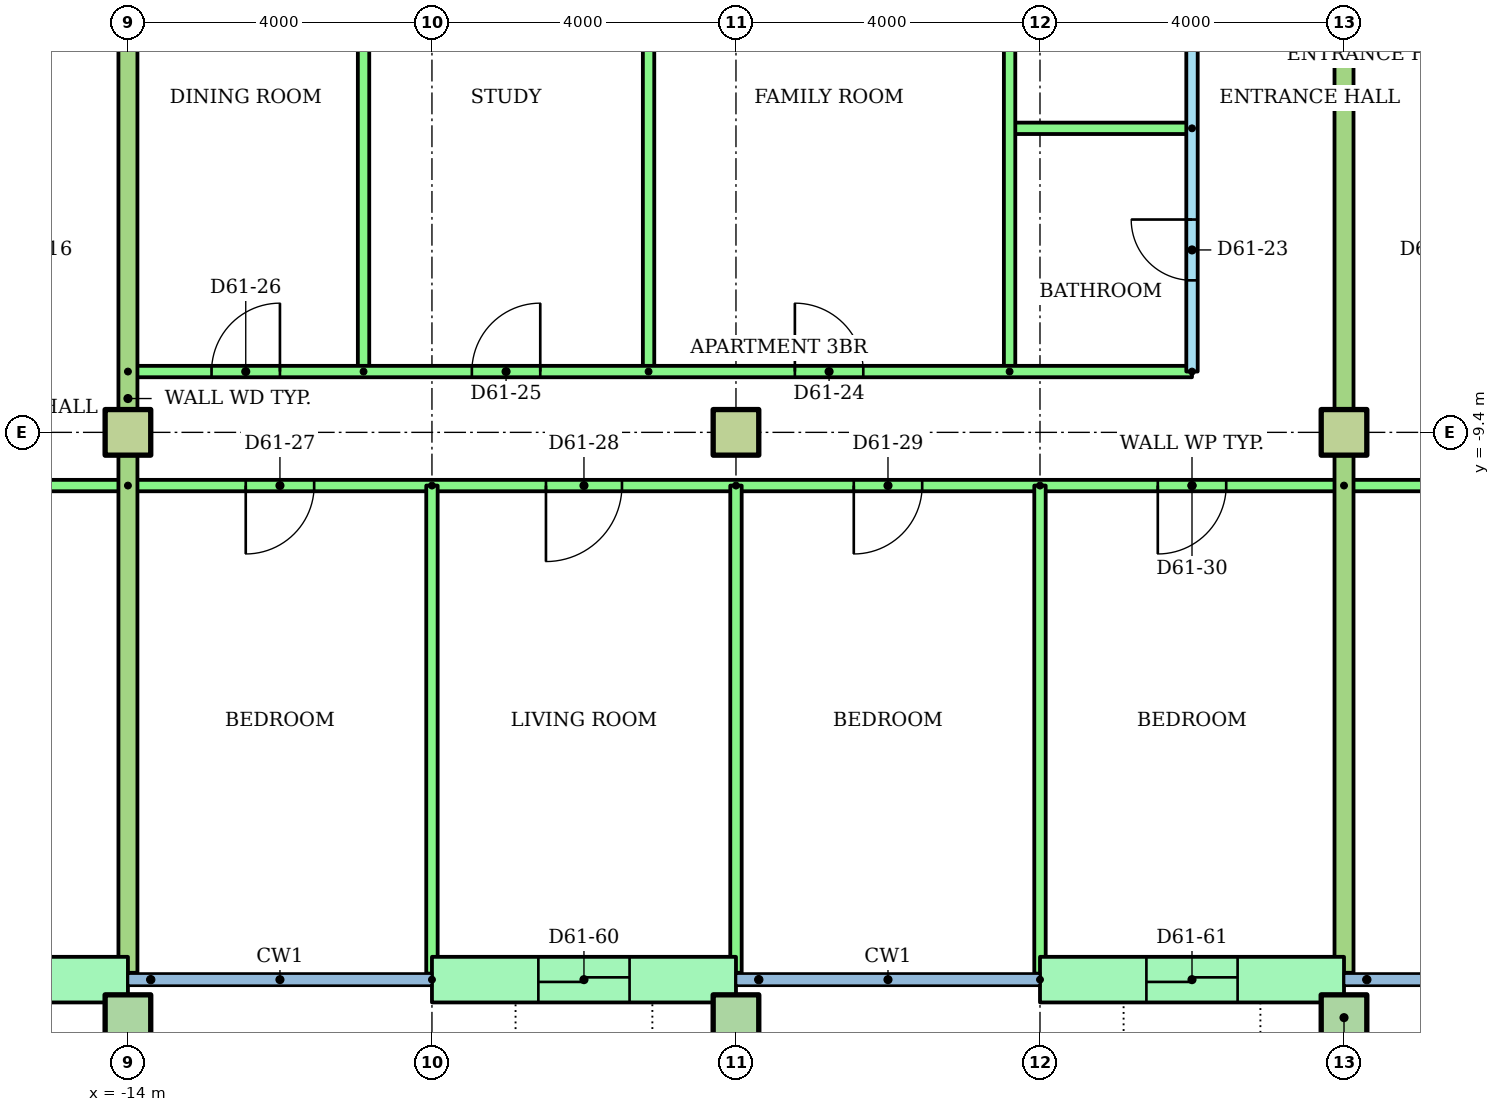
"""IFC4 building model, lengths in metres.
Left out: names, types, materials, properties, quantities, classifications, styles, units other than length and angle.
Written with IfcOpenShell. Run it as: python <this file> out.ifc"""

import sys

from ifc_helpers import new_model, si_unit, direction, frame, frame_2d, origin, origin_2d, place, context, subcontext, project, spatial, rectangle, hollow_rectangle, extrude, element, fill, save


model = new_model("IFC4")
c1 = context("Model", 3, precision=1e-05, world=origin(), true_north=direction((0.0, 1.0)))
c2 = subcontext(c1, "Body", "Model", "MODEL_VIEW")
j1 = project(units=[si_unit("LENGTHUNIT", "METRE"), si_unit("PLANEANGLEUNIT", "RADIAN")], contexts=[c1])
p1 = place(None, origin())
s1 = spatial("IfcSite", under=j1, at=p1, CompositionType="ELEMENT")
p2 = place(p1, origin())
s2 = spatial("IfcBuilding", under=s1, at=p2, CompositionType="ELEMENT")
p3 = place(p2, frame((0.0, 0.0, 233.2)))
s3 = spatial("IfcBuildingStorey", under=s2, at=p3, CompositionType="ELEMENT", Elevation=233.2)
for number, where in (
    (1, (-14.0, -17.1, 0.0)),
    (2, (-6.0, -17.1, 0.0)),
    (3, (2.0, -17.1, 0.0)),
):
    element("IfcColumn", number, at=place(p3, frame(where)), inside=s3, PredefinedType="COLUMN", context=c2, shape_type="SweptSolid", body=[
        extrude(hollow_rectangle(XDim=0.6, YDim=0.6, WallThickness=0.03, at=origin_2d()), origin(), (0.0, 0.0, 1.0), 3.2),
    ])
for number, where in (
    (4, (-14.0, -9.4, 0.0)),
    (5, (-6.0, -9.4, 0.0)),
    (6, (2.0, -9.4, 0.0)),
):
    element("IfcColumn", number, at=place(p3, frame(where)), inside=s3, PredefinedType="COLUMN", context=c2, shape_type="SweptSolid", body=[
        extrude(rectangle(XDim=0.6, YDim=0.6, at=origin_2d()), origin(), (0.0, 0.0, 1.0), 3.2),
    ])
p4 = place(p3, frame((-18.0, -16.6, 0.0)))
e7 = element("IfcWall", 7, at=p4, inside=s3, PredefinedType="STANDARD", context=c2, shape_type="SweptSolid", body=[
    extrude(rectangle(XDim=4.0, YDim=0.6, at=frame_2d((2.0, 0.0))), origin(), (0.0, 0.0, 1.0), 2.92),
])
p5 = place(p4, frame((1.4, 0.0, 0.0)))
e8 = element("IfcOpeningElement", 8, at=p5, cuts=e7, PredefinedType="OPENING", context=c2, shape_type="SweptSolid", body=[
    extrude(rectangle(XDim=1.2, YDim=2.1, at=frame_2d((0.6, 1.05))), frame((0.0, 0.31, 0.0), z_axis=(0.0, -1.0, 0.0), x_axis=(1.0, 0.0, 0.0)), (0.0, 0.0, 1.0), 0.62),
])
p6 = place(p3, frame((-10.0, -16.6, 0.0)))
e9 = element("IfcWall", 9, at=p6, inside=s3, PredefinedType="STANDARD", context=c2, shape_type="SweptSolid", body=[
    extrude(rectangle(XDim=4.0, YDim=0.6, at=frame_2d((2.0, 0.0))), origin(), (0.0, 0.0, 1.0), 2.92),
])
p7 = place(p6, frame((1.4, 0.0, 0.0)))
e10 = element("IfcOpeningElement", 10, at=p7, cuts=e9, PredefinedType="OPENING", context=c2, shape_type="SweptSolid", body=[
    extrude(rectangle(XDim=1.2, YDim=2.1, at=frame_2d((0.6, 1.05))), frame((0.0, 0.31, 0.0), z_axis=(0.0, -1.0, 0.0), x_axis=(1.0, 0.0, 0.0)), (0.0, 0.0, 1.0), 0.62),
])
p8 = place(p3, frame((-2.0, -16.6, 0.0)))
e11 = element("IfcWall", 11, at=p8, inside=s3, PredefinedType="STANDARD", context=c2, shape_type="SweptSolid", body=[
    extrude(rectangle(XDim=4.0, YDim=0.6, at=frame_2d((2.0, 0.0))), origin(), (0.0, 0.0, 1.0), 2.92),
])
p9 = place(p8, frame((1.4, 0.0, 0.0)))
e12 = element("IfcOpeningElement", 12, at=p9, cuts=e11, PredefinedType="OPENING", context=c2, shape_type="SweptSolid", body=[
    extrude(rectangle(XDim=1.2, YDim=2.1, at=frame_2d((0.6, 1.05))), frame((0.0, 0.31, 0.0), z_axis=(0.0, -1.0, 0.0), x_axis=(1.0, 0.0, 0.0)), (0.0, 0.0, 1.0), 0.62),
])
p10 = place(p3, frame((-14.0, -10.1, 0.0), z_axis=(0.0, 0.0, 1.0), x_axis=(-1.0, 0.0, 0.0)))
e13 = element("IfcWall", 13, at=p10, inside=s3, PredefinedType="PARTITIONING", context=c2, shape_type="SweptSolid", body=[
    extrude(rectangle(XDim=14.92, YDim=0.15, at=frame_2d((7.46, 0.0))), origin(), (0.0, 0.0, 1.0), 2.4),
])
p11 = place(p10, frame((12.0, 0.0, 0.0)))
e14 = element("IfcOpeningElement", 14, at=p11, cuts=e13, PredefinedType="OPENING", context=c2, shape_type="SweptSolid", body=[
    extrude(rectangle(XDim=0.9, YDim=2.1, at=frame_2d((0.45, 1.05))), frame((0.0, 0.085, 0.0), z_axis=(0.0, -1.0, 0.0), x_axis=(1.0, 0.0, 0.0)), (0.0, 0.0, 1.0), 0.17),
])
p12 = place(p10, frame((4.6, 0.0, 0.0)))
e15 = element("IfcOpeningElement", 15, at=p12, cuts=e13, PredefinedType="OPENING", context=c2, shape_type="SweptSolid", body=[
    extrude(rectangle(XDim=1.0, YDim=2.1, at=frame_2d((0.5, 1.05))), frame((0.0, 0.085, 0.0), z_axis=(0.0, -1.0, 0.0), x_axis=(1.0, 0.0, 0.0)), (0.0, 0.0, 1.0), 0.17),
])
p13 = place(p3, frame((0.0, -8.6, 0.0), z_axis=(0.0, 0.0, 1.0), x_axis=(0.0, 1.0, 0.0)))
e16 = element("IfcWall", 16, at=p13, inside=s3, PredefinedType="PARTITIONING", context=c2, shape_type="SweptSolid", body=[
    extrude(rectangle(XDim=7.2, YDim=0.15, at=frame_2d((3.6, 0.0))), origin(), (0.0, 0.0, 1.0), 2.4),
])
p14 = place(p13, frame((4.75, 0.0, 0.0)))
e17 = element("IfcOpeningElement", 17, at=p14, cuts=e16, PredefinedType="OPENING", context=c2, shape_type="SweptSolid", body=[
    extrude(rectangle(XDim=0.9, YDim=2.1, at=frame_2d((0.45, 1.05))), frame((0.0, 0.085, 0.0), z_axis=(0.0, -1.0, 0.0), x_axis=(1.0, 0.0, 0.0)), (0.0, 0.0, 1.0), 0.17),
])
p15 = place(p13, frame((1.2, 0.0, 0.0)))
e18 = element("IfcOpeningElement", 18, at=p15, cuts=e16, PredefinedType="OPENING", context=c2, shape_type="SweptSolid", body=[
    extrude(rectangle(XDim=0.8, YDim=2.1, at=frame_2d((0.4, 1.05))), frame((0.0, 0.085, 0.0), z_axis=(0.0, -1.0, 0.0), x_axis=(1.0, 0.0, 0.0)), (0.0, 0.0, 1.0), 0.17),
])
p16 = place(p3, frame((0.0, -5.4, 0.0), z_axis=(0.0, 0.0, 1.0), x_axis=(-1.0, 0.0, 0.0)))
e19 = element("IfcWall", 19, at=p16, inside=s3, PredefinedType="PARTITIONING", context=c2, shape_type="SweptSolid", body=[
    extrude(rectangle(XDim=2.4, YDim=0.15, at=frame_2d((1.2, 0.0))), origin(), (0.0, 0.0, 1.0), 2.4),
])
for number, where, z_axis, x_axis in (
    (20, (-2.4, -8.6, 0.0), (0.0, 0.0, 1.0), (0.0, 1.0, 0.0)),
    (21, (-7.15, -8.6, 0.0), (0.0, 0.0, 1.0), (0.0, 1.0, 0.0)),
    (22, (-10.9, -8.6, 0.0), (0.0, 0.0, 1.0), (0.0, 1.0, 0.0)),
):
    element("IfcWall", number, at=place(p3, frame(where, z_axis=z_axis, x_axis=x_axis)), inside=s3, PredefinedType="PARTITIONING", context=c2, shape_type="SweptSolid", body=[
        extrude(rectangle(XDim=7.2, YDim=0.15, at=frame_2d((3.6, 0.0))), origin(), (0.0, 0.0, 1.0), 2.4),
    ])
p17 = place(p3, frame((-14.0, -8.6, 0.0)))
e23 = element("IfcWall", 23, at=p17, inside=s3, PredefinedType="PARTITIONING", context=c2, shape_type="SweptSolid", body=[
    extrude(rectangle(XDim=14.0, YDim=0.15, at=frame_2d((7.0, 0.0))), origin(), (0.0, 0.0, 1.0), 2.4),
])
p18 = place(p17, frame((8.775, 0.0, 0.0)))
e24 = element("IfcOpeningElement", 24, at=p18, cuts=e23, PredefinedType="OPENING", context=c2, shape_type="SweptSolid", body=[
    extrude(rectangle(XDim=0.9, YDim=2.1, at=frame_2d((0.45, 1.05))), frame((0.0, 0.085, 0.0), z_axis=(0.0, -1.0, 0.0), x_axis=(1.0, 0.0, 0.0)), (0.0, 0.0, 1.0), 0.17),
])
p19 = place(p17, frame((4.525, 0.0, 0.0)))
e25 = element("IfcOpeningElement", 25, at=p19, cuts=e23, PredefinedType="OPENING", context=c2, shape_type="SweptSolid", body=[
    extrude(rectangle(XDim=0.9, YDim=2.1, at=frame_2d((0.45, 1.05))), frame((0.0, 0.085, 0.0), z_axis=(0.0, -1.0, 0.0), x_axis=(1.0, 0.0, 0.0)), (0.0, 0.0, 1.0), 0.17),
])
p20 = place(p17, frame((1.1, 0.0, 0.0)))
e26 = element("IfcOpeningElement", 26, at=p20, cuts=e23, PredefinedType="OPENING", context=c2, shape_type="SweptSolid", body=[
    extrude(rectangle(XDim=0.9, YDim=2.1, at=frame_2d((0.45, 1.05))), frame((0.0, 0.085, 0.0), z_axis=(0.0, -1.0, 0.0), x_axis=(1.0, 0.0, 0.0)), (0.0, 0.0, 1.0), 0.17),
])
p21 = place(p3, frame((2.0, -10.1, 0.0), z_axis=(0.0, 0.0, 1.0), x_axis=(-1.0, 0.0, 0.0)))
e27 = element("IfcWall", 27, at=p21, inside=s3, PredefinedType="PARTITIONING", context=c2, shape_type="SweptSolid", body=[
    extrude(rectangle(XDim=16.0, YDim=0.15, at=frame_2d((8.0, 0.0))), origin(), (0.0, 0.0, 1.0), 2.4),
])
p22 = place(p21, frame((13.55, 0.0, 0.0)))
e28 = element("IfcOpeningElement", 28, at=p22, cuts=e27, PredefinedType="OPENING", context=c2, shape_type="SweptSolid", body=[
    extrude(rectangle(XDim=0.9, YDim=2.1, at=frame_2d((0.45, 1.05))), frame((0.0, 0.085, 0.0), z_axis=(0.0, -1.0, 0.0), x_axis=(1.0, 0.0, 0.0)), (0.0, 0.0, 1.0), 0.17),
])
p23 = place(p21, frame((9.5, 0.0, 0.0)))
e29 = element("IfcOpeningElement", 29, at=p23, cuts=e27, PredefinedType="OPENING", context=c2, shape_type="SweptSolid", body=[
    extrude(rectangle(XDim=1.0, YDim=2.1, at=frame_2d((0.5, 1.05))), frame((0.0, 0.085, 0.0), z_axis=(0.0, -1.0, 0.0), x_axis=(1.0, 0.0, 0.0)), (0.0, 0.0, 1.0), 0.17),
])
p24 = place(p21, frame((5.55, 0.0, 0.0)))
e30 = element("IfcOpeningElement", 30, at=p24, cuts=e27, PredefinedType="OPENING", context=c2, shape_type="SweptSolid", body=[
    extrude(rectangle(XDim=0.9, YDim=2.1, at=frame_2d((0.45, 1.05))), frame((0.0, 0.085, 0.0), z_axis=(0.0, -1.0, 0.0), x_axis=(1.0, 0.0, 0.0)), (0.0, 0.0, 1.0), 0.17),
])
p25 = place(p21, frame((1.55, 0.0, 0.0)))
e31 = element("IfcOpeningElement", 31, at=p25, cuts=e27, PredefinedType="OPENING", context=c2, shape_type="SweptSolid", body=[
    extrude(rectangle(XDim=0.9, YDim=2.1, at=frame_2d((0.45, 1.05))), frame((0.0, 0.085, 0.0), z_axis=(0.0, -1.0, 0.0), x_axis=(1.0, 0.0, 0.0)), (0.0, 0.0, 1.0), 0.17),
])
p26 = place(p3, frame((-10.0, -10.1, 0.0), z_axis=(0.0, 0.0, 1.0), x_axis=(0.0, -1.0, 0.0)))
e32 = element("IfcWall", 32, at=p26, inside=s3, PredefinedType="PARTITIONING", context=c2, shape_type="SweptSolid", body=[
    extrude(rectangle(XDim=6.421, YDim=0.15, at=frame_2d((3.21, 0.0))), origin(), (0.0, 0.0, 1.0), 2.4),
])
p27 = place(p3, frame((-6.0, -10.1, 0.0), z_axis=(0.0, 0.0, 1.0), x_axis=(0.0, -1.0, 0.0)))
e33 = element("IfcWall", 33, at=p27, inside=s3, PredefinedType="PARTITIONING", context=c2, shape_type="SweptSolid", body=[
    extrude(rectangle(XDim=6.41, YDim=0.15, at=frame_2d((3.205, 0.0))), origin(), (0.0, 0.0, 1.0), 2.4),
])
p28 = place(p3, frame((-2.0, -10.1, 0.0), z_axis=(0.0, 0.0, 1.0), x_axis=(0.0, -1.0, 0.0)))
e34 = element("IfcWall", 34, at=p28, inside=s3, PredefinedType="PARTITIONING", context=c2, shape_type="SweptSolid", body=[
    extrude(rectangle(XDim=6.421, YDim=0.15, at=frame_2d((3.21, 0.0))), origin(), (0.0, 0.0, 1.0), 2.4),
])
p29 = place(p3, frame((-14.0, -1.4, 0.0), z_axis=(0.0, 0.0, 1.0), x_axis=(0.0, -1.0, 0.0)))
e35 = element("IfcWall", 35, at=p29, inside=s3, PredefinedType="PARTITIONING", context=c2, shape_type="SweptSolid", body=[
    extrude(rectangle(XDim=15.11, YDim=0.25, at=frame_2d((7.555, 0.0))), origin(), (0.0, 0.0, 1.0), 2.4),
])
p30 = place(p3, frame((28.92, -10.1, 0.0), z_axis=(0.0, 0.0, 1.0), x_axis=(-1.0, 0.0, 0.0)))
e36 = element("IfcWall", 36, at=p30, inside=s3, PredefinedType="PARTITIONING", context=c2, shape_type="SweptSolid", body=[
    extrude(rectangle(XDim=26.92, YDim=0.15, at=frame_2d((13.46, 0.0))), origin(), (0.0, 0.0, 1.0), 2.4),
])
p31 = place(p30, frame((22.42, 0.0, 0.0)))
e37 = element("IfcOpeningElement", 37, at=p31, cuts=e36, PredefinedType="OPENING", context=c2, shape_type="SweptSolid", body=[
    extrude(rectangle(XDim=1.0, YDim=2.1, at=frame_2d((0.5, 1.05))), frame((0.0, 0.085, 0.0), z_axis=(0.0, -1.0, 0.0), x_axis=(1.0, 0.0, 0.0)), (0.0, 0.0, 1.0), 0.17),
])
p32 = place(p30, frame((16.47, 0.0, 0.0)))
e38 = element("IfcOpeningElement", 38, at=p32, cuts=e36, PredefinedType="OPENING", context=c2, shape_type="SweptSolid", body=[
    extrude(rectangle(XDim=0.9, YDim=2.1, at=frame_2d((0.45, 1.05))), frame((0.0, 0.085, 0.0), z_axis=(0.0, -1.0, 0.0), x_axis=(1.0, 0.0, 0.0)), (0.0, 0.0, 1.0), 0.17),
])
p33 = place(p30, frame((12.47, 0.0, 0.0)))
e39 = element("IfcOpeningElement", 39, at=p33, cuts=e36, PredefinedType="OPENING", context=c2, shape_type="SweptSolid", body=[
    extrude(rectangle(XDim=0.9, YDim=2.1, at=frame_2d((0.45, 1.05))), frame((0.0, 0.085, 0.0), z_axis=(0.0, -1.0, 0.0), x_axis=(1.0, 0.0, 0.0)), (0.0, 0.0, 1.0), 0.17),
])
p34 = place(p30, frame((7.37, 0.0, 0.0)))
e40 = element("IfcOpeningElement", 40, at=p34, cuts=e36, PredefinedType="OPENING", context=c2, shape_type="SweptSolid", body=[
    extrude(rectangle(XDim=0.9, YDim=2.1, at=frame_2d((0.45, 1.05))), frame((0.0, 0.085, 0.0), z_axis=(0.0, -1.0, 0.0), x_axis=(1.0, 0.0, 0.0)), (0.0, 0.0, 1.0), 0.17),
])
p35 = place(p30, frame((1.544, 0.0, 0.0)))
e41 = element("IfcOpeningElement", 41, at=p35, cuts=e36, PredefinedType="OPENING", context=c2, shape_type="SweptSolid", body=[
    extrude(rectangle(XDim=0.9, YDim=2.1, at=frame_2d((0.45, 1.05))), frame((0.0, 0.085, 0.0), z_axis=(0.0, -1.0, 0.0), x_axis=(1.0, 0.0, 0.0)), (0.0, 0.0, 1.0), 0.17),
])
p36 = place(p3, frame((2.0, -1.4, 0.0), z_axis=(0.0, 0.0, 1.0), x_axis=(0.0, -1.0, 0.0)))
e42 = element("IfcWall", 42, at=p36, inside=s3, PredefinedType="PARTITIONING", context=c2, shape_type="SweptSolid", body=[
    extrude(rectangle(XDim=15.11, YDim=0.25, at=frame_2d((7.555, 0.0))), origin(), (0.0, 0.0, 1.0), 2.4),
])
p37 = place(p15, origin())
e43 = element("IfcDoor", 43, at=p37, inside=s3, OperationType="SINGLE_SWING_RIGHT", PredefinedType="DOOR", context=c2, shape_type="SweptSolid", body=[
    extrude(rectangle(XDim=0.8, YDim=2.1, at=frame_2d((0.4, 1.05))), frame((0.0, 0.025, 0.0), z_axis=(0.0, -1.0, 0.0), x_axis=(1.0, 0.0, 0.0)), (0.0, 0.0, 1.0), 0.05),
])
fill(e18, e43)
p38 = place(p18, origin())
e44 = element("IfcDoor", 44, at=p38, inside=s3, OperationType="SINGLE_SWING_LEFT", PredefinedType="DOOR", context=c2, shape_type="SweptSolid", body=[
    extrude(rectangle(XDim=0.9, YDim=2.1, at=frame_2d((0.45, 1.05))), frame((0.0, 0.025, 0.0), z_axis=(0.0, -1.0, 0.0), x_axis=(1.0, 0.0, 0.0)), (0.0, 0.0, 1.0), 0.05),
])
fill(e24, e44)
p39 = place(p19, origin())
e45 = element("IfcDoor", 45, at=p39, inside=s3, OperationType="SINGLE_SWING_RIGHT", PredefinedType="DOOR", context=c2, shape_type="SweptSolid", body=[
    extrude(rectangle(XDim=0.9, YDim=2.1, at=frame_2d((0.45, 1.05))), frame((0.0, 0.025, 0.0), z_axis=(0.0, -1.0, 0.0), x_axis=(1.0, 0.0, 0.0)), (0.0, 0.0, 1.0), 0.05),
])
fill(e25, e45)
p40 = place(p20, origin())
e46 = element("IfcDoor", 46, at=p40, inside=s3, OperationType="SINGLE_SWING_RIGHT", PredefinedType="DOOR", context=c2, shape_type="SweptSolid", body=[
    extrude(rectangle(XDim=0.9, YDim=2.1, at=frame_2d((0.45, 1.05))), frame((0.0, 0.025, 0.0), z_axis=(0.0, -1.0, 0.0), x_axis=(1.0, 0.0, 0.0)), (0.0, 0.0, 1.0), 0.05),
])
fill(e26, e46)
p41 = place(p22, origin())
e47 = element("IfcDoor", 47, at=p41, inside=s3, OperationType="SINGLE_SWING_RIGHT", PredefinedType="DOOR", context=c2, shape_type="SweptSolid", body=[
    extrude(rectangle(XDim=0.9, YDim=2.1, at=frame_2d((0.45, 1.05))), frame((0.0, 0.025, 0.0), z_axis=(0.0, -1.0, 0.0), x_axis=(1.0, 0.0, 0.0)), (0.0, 0.0, 1.0), 0.05),
])
fill(e28, e47)
p42 = place(p23, origin())
e48 = element("IfcDoor", 48, at=p42, inside=s3, OperationType="SINGLE_SWING_RIGHT", PredefinedType="DOOR", context=c2, shape_type="SweptSolid", body=[
    extrude(rectangle(XDim=1.0, YDim=2.1, at=frame_2d((0.5, 1.05))), frame((0.0, 0.025, 0.0), z_axis=(0.0, -1.0, 0.0), x_axis=(1.0, 0.0, 0.0)), (0.0, 0.0, 1.0), 0.05),
])
fill(e29, e48)
p43 = place(p24, origin())
e49 = element("IfcDoor", 49, at=p43, inside=s3, OperationType="SINGLE_SWING_RIGHT", PredefinedType="DOOR", context=c2, shape_type="SweptSolid", body=[
    extrude(rectangle(XDim=0.9, YDim=2.1, at=frame_2d((0.45, 1.05))), frame((0.0, 0.025, 0.0), z_axis=(0.0, -1.0, 0.0), x_axis=(1.0, 0.0, 0.0)), (0.0, 0.0, 1.0), 0.05),
])
fill(e30, e49)
p44 = place(p25, origin())
e50 = element("IfcDoor", 50, at=p44, inside=s3, OperationType="SINGLE_SWING_RIGHT", PredefinedType="DOOR", context=c2, shape_type="SweptSolid", body=[
    extrude(rectangle(XDim=0.9, YDim=2.1, at=frame_2d((0.45, 1.05))), frame((0.0, 0.025, 0.0), z_axis=(0.0, -1.0, 0.0), x_axis=(1.0, 0.0, 0.0)), (0.0, 0.0, 1.0), 0.05),
])
fill(e31, e50)
p45 = place(p7, origin())
e51 = element("IfcDoor", 51, at=p45, inside=s3, OperationType="SLIDING_TO_LEFT", PredefinedType="DOOR", context=c2, shape_type="SweptSolid", body=[
    extrude(rectangle(XDim=1.2, YDim=2.1, at=frame_2d((0.6, 1.05))), frame((0.0, 0.025, 0.0), z_axis=(0.0, -1.0, 0.0), x_axis=(1.0, 0.0, 0.0)), (0.0, 0.0, 1.0), 0.05),
])
fill(e10, e51)
p46 = place(p9, origin())
e52 = element("IfcDoor", 52, at=p46, inside=s3, OperationType="SLIDING_TO_LEFT", PredefinedType="DOOR", context=c2, shape_type="SweptSolid", body=[
    extrude(rectangle(XDim=1.2, YDim=2.1, at=frame_2d((0.6, 1.05))), frame((0.0, 0.025, 0.0), z_axis=(0.0, -1.0, 0.0), x_axis=(1.0, 0.0, 0.0)), (0.0, 0.0, 1.0), 0.05),
])
fill(e12, e52)
save(model, sys.argv[1])
